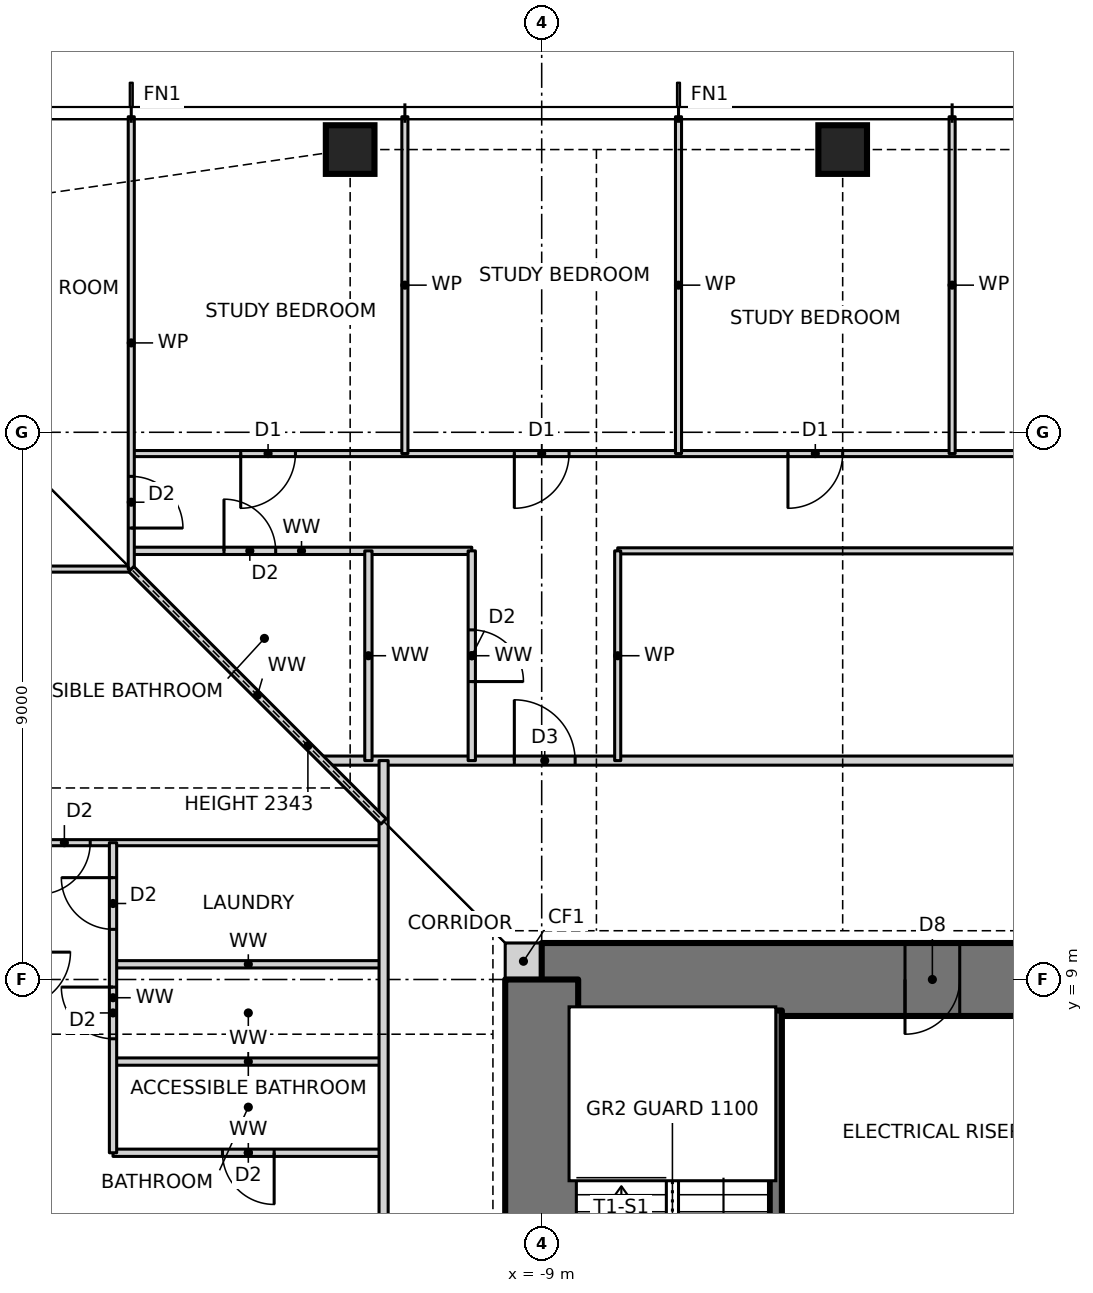
"""IFC4 building model, lengths in metres.
Left out: names, types, materials, properties, quantities, classifications, styles, units other than length and angle.
Written with IfcOpenShell. Run it as: python <this file> out.ifc"""

import sys

from ifc_helpers import new_model, si_unit, direction, frame, frame_2d, origin, origin_2d, place, context, subcontext, project, spatial, rectangle, hollow_rectangle, extrude, element, fill, save


model = new_model("IFC4")
c1 = context("Model", 3, precision=1e-05, world=origin(), true_north=direction((0.0, 1.0)))
c2 = subcontext(c1, "Body", "Model", "MODEL_VIEW")
j1 = project(units=[si_unit("LENGTHUNIT", "METRE"), si_unit("PLANEANGLEUNIT", "RADIAN")], contexts=[c1])
p1 = place(None, origin())
s1 = spatial("IfcSite", under=j1, at=p1, CompositionType="ELEMENT")
p2 = place(p1, origin())
s2 = spatial("IfcBuilding", under=s1, at=p2, CompositionType="ELEMENT")
p3 = place(p2, frame((0.0, 0.0, 43.0)))
s3 = spatial("IfcBuildingStorey", under=s2, at=p3, CompositionType="ELEMENT", Elevation=43.0)
for number, where, z_axis, x_axis in (
    (1, (-4.05, 22.65, 0.0), (0.0, 0.0, 1.0), (1.0, 0.0, 0.0)),
    (2, (-12.15, 22.65, 0.0), (0.0, 0.0, 1.0), (1.0, 0.0, 0.0)),
):
    element("IfcColumn", number, at=place(p3, frame(where, z_axis=z_axis, x_axis=x_axis)), inside=s3, PredefinedType="COLUMN", context=c2, shape_type="SweptSolid", body=[
        extrude(hollow_rectangle(XDim=0.8, YDim=0.8, WallThickness=0.09, at=origin_2d()), origin(), (0.0, 0.0, 1.0), 3.5),
    ])
p4 = place(p3, frame((-9.6, 9.3, 0.0), z_axis=(0.0, 0.0, 1.0), x_axis=(1.0, 0.0, 0.0)))
e3 = element("IfcWall", 3, at=p4, inside=s3, PredefinedType="SOLIDWALL", context=c2, shape_type="SweptSolid", body=[
    extrude(rectangle(XDim=0.6, YDim=0.6, at=frame_2d((0.3, 0.0))), origin(), (0.0, 0.0, 1.0), 3.5),
])
p5 = place(p3, frame((9.0, 9.0, 0.0), z_axis=(0.0, 0.0, 1.0), x_axis=(-1.0, 0.0, 0.0)))
e4 = element("IfcWall", 4, at=p5, inside=s3, PredefinedType="SHEAR", context=c2, shape_type="SweptSolid", body=[
    extrude(rectangle(XDim=18.0, YDim=1.2, at=frame_2d((9.0, 0.0))), origin(), (0.0, 0.0, 1.0), 3.5),
])
p6 = place(p5, frame((11.125, 0.0, 0.0)))
e5 = element("IfcOpeningElement", 5, at=p6, cuts=e4, PredefinedType="OPENING", context=c2, shape_type="SweptSolid", body=[
    extrude(rectangle(XDim=0.9, YDim=2.1, at=frame_2d((0.45, 1.05))), frame((0.0, 0.61, 0.0), z_axis=(0.0, -1.0, 0.0), x_axis=(1.0, 0.0, 0.0)), (0.0, 0.0, 1.0), 1.22),
])
p7 = place(p5, frame((4.275, 0.0, 0.0)))
e6 = element("IfcOpeningElement", 6, at=p7, cuts=e4, PredefinedType="OPENING", context=c2, shape_type="SweptSolid", body=[
    extrude(rectangle(XDim=0.9, YDim=2.1, at=frame_2d((0.45, 1.05))), frame((0.0, 0.61, 0.0), z_axis=(0.0, -1.0, 0.0), x_axis=(1.0, 0.0, 0.0)), (0.0, 0.0, 1.0), 1.22),
])
p8 = place(p3, frame((-9.0, 9.0, 0.0), z_axis=(0.0, 0.0, 1.0), x_axis=(0.0, -1.0, 0.0)))
e7 = element("IfcWall", 7, at=p8, inside=s3, PredefinedType="SHEAR", context=c2, shape_type="SweptSolid", body=[
    extrude(rectangle(XDim=18.0, YDim=1.2, at=frame_2d((9.0, 0.0))), origin(), (0.0, 0.0, 1.0), 3.5),
])
p9 = place(p8, frame((8.5, 0.0, 0.0)))
e8 = element("IfcOpeningElement", 8, at=p9, cuts=e7, PredefinedType="OPENING", context=c2, shape_type="SweptSolid", body=[
    extrude(rectangle(XDim=1.0, YDim=2.1, at=frame_2d((0.5, 1.05))), frame((0.0, 0.61, 0.0), z_axis=(0.0, -1.0, 0.0), x_axis=(1.0, 0.0, 0.0)), (0.0, 0.0, 1.0), 1.22),
])
p10 = place(p3, frame((-16.05, 6.15, 0.0), z_axis=(0.0, 0.0, 1.0), x_axis=(1.0, 0.0, 0.0)))
e9 = element("IfcWall", 9, at=p10, inside=s3, PredefinedType="PARTITIONING", context=c2, shape_type="SweptSolid", body=[
    extrude(rectangle(XDim=4.45, YDim=0.12, at=frame_2d((2.225, 0.0))), origin(), (0.0, 0.0, 1.0), 3.27),
])
p11 = place(p10, frame((1.8, 0.0, 0.0)))
e10 = element("IfcOpeningElement", 10, at=p11, cuts=e9, PredefinedType="OPENING", context=c2, shape_type="SweptSolid", body=[
    extrude(rectangle(XDim=0.85, YDim=2.1, at=frame_2d((0.425, 1.05))), frame((0.0, 0.07, 0.0), z_axis=(0.0, -1.0, 0.0), x_axis=(1.0, 0.0, 0.0)), (0.0, 0.0, 1.0), 0.14),
])
for number, where, z_axis, x_axis in (
    (11, (-16.05, 7.65, 0.0), (0.0, 0.0, 1.0), (1.0, 0.0, 0.0)),
    (12, (-16.05, 9.25, 0.0), (0.0, 0.0, 1.0), (1.0, 0.0, 0.0)),
):
    element("IfcWall", number, at=place(p3, frame(where, z_axis=z_axis, x_axis=x_axis)), inside=s3, PredefinedType="PARTITIONING", context=c2, shape_type="SweptSolid", body=[
        extrude(rectangle(XDim=4.45, YDim=0.12, at=frame_2d((2.225, 0.0))), origin(), (0.0, 0.0, 1.0), 3.27),
    ])
p12 = place(p3, frame((-23.19, 11.25, 0.0), z_axis=(0.0, 0.0, 1.0), x_axis=(1.0, 0.0, 0.0)))
e13 = element("IfcWall", 13, at=p12, inside=s3, PredefinedType="PARTITIONING", context=c2, shape_type="SweptSolid", body=[
    extrude(rectangle(XDim=11.59, YDim=0.1, at=frame_2d((5.795, 0.0))), origin(), (0.0, 0.0, 1.0), 3.27),
])
p13 = place(p12, frame((5.915, 0.0, 0.0)))
e14 = element("IfcOpeningElement", 14, at=p13, cuts=e13, PredefinedType="OPENING", context=c2, shape_type="SweptSolid", body=[
    extrude(rectangle(XDim=0.85, YDim=2.1, at=frame_2d((0.425, 1.05))), frame((0.0, 0.06, 0.0), z_axis=(0.0, -1.0, 0.0), x_axis=(1.0, 0.0, 0.0)), (0.0, 0.0, 1.0), 0.12),
])
p14 = place(p3, frame((-12.6, 12.6, 0.0), z_axis=(0.0, 0.0, 1.0), x_axis=(1.0, 0.0, 0.0)))
e15 = element("IfcWall", 15, at=p14, inside=s3, PredefinedType="PARTITIONING", context=c2, shape_type="SweptSolid", body=[
    extrude(rectangle(XDim=25.2, YDim=0.15, at=frame_2d((12.6, 0.0))), origin(), (0.0, 0.0, 1.0), 3.27),
])
p15 = place(p14, frame((3.15, 0.0, 0.0)))
e16 = element("IfcOpeningElement", 16, at=p15, cuts=e15, PredefinedType="OPENING", context=c2, shape_type="SweptSolid", body=[
    extrude(rectangle(XDim=1.0, YDim=2.1, at=frame_2d((0.5, 1.05))), frame((0.0, 0.085, 0.0), z_axis=(0.0, -1.0, 0.0), x_axis=(1.0, 0.0, 0.0)), (0.0, 0.0, 1.0), 0.17),
])
p16 = place(p3, frame((-23.19, 15.75, 0.0), z_axis=(0.0, 0.0, 1.0), x_axis=(1.0, 0.0, 0.0)))
e17 = element("IfcWall", 17, at=p16, inside=s3, PredefinedType="PARTITIONING", context=c2, shape_type="SweptSolid", body=[
    extrude(rectangle(XDim=7.44, YDim=0.1, at=frame_2d((3.72, 0.0))), origin(), (0.0, 0.0, 1.0), 3.27),
])
p17 = place(p3, frame((-15.75, 16.05, 0.0), z_axis=(0.0, 0.0, 1.0), x_axis=(1.0, 0.0, 0.0)))
e18 = element("IfcWall", 18, at=p17, inside=s3, PredefinedType="PARTITIONING", context=c2, shape_type="SweptSolid", body=[
    extrude(rectangle(XDim=5.6, YDim=0.12, at=frame_2d((2.8, 0.0))), origin(), (0.0, 0.0, 1.0), 3.27),
])
p18 = place(p17, frame((1.525, 0.0, 0.0)))
e19 = element("IfcOpeningElement", 19, at=p18, cuts=e18, PredefinedType="OPENING", context=c2, shape_type="SweptSolid", body=[
    extrude(rectangle(XDim=0.85, YDim=2.1, at=frame_2d((0.425, 1.05))), frame((0.0, 0.07, 0.0), z_axis=(0.0, -1.0, 0.0), x_axis=(1.0, 0.0, 0.0)), (0.0, 0.0, 1.0), 0.14),
])
p19 = place(p3, frame((-7.75, 16.05, 0.0), z_axis=(0.0, 0.0, 1.0), x_axis=(1.0, 0.0, 0.0)))
e20 = element("IfcWall", 20, at=p19, inside=s3, PredefinedType="PARTITIONING", context=c2, shape_type="SweptSolid", body=[
    extrude(rectangle(XDim=17.9, YDim=0.1, at=frame_2d((8.95, 0.0))), origin(), (0.0, 0.0, 1.0), 3.27),
])
p20 = place(p19, frame((8.525, 0.0, 0.0)))
e21 = element("IfcOpeningElement", 21, at=p20, cuts=e20, PredefinedType="OPENING", context=c2, shape_type="SweptSolid", body=[
    extrude(rectangle(XDim=0.85, YDim=2.1, at=frame_2d((0.425, 1.05))), frame((0.0, 0.06, 0.0), z_axis=(0.0, -1.0, 0.0), x_axis=(1.0, 0.0, 0.0)), (0.0, 0.0, 1.0), 0.12),
])
p21 = place(p3, frame((-15.75, 17.65, 0.0), z_axis=(0.0, 0.0, 1.0), x_axis=(1.0, 0.0, 0.0)))
e22 = element("IfcWall", 22, at=p21, inside=s3, PredefinedType="PARTITIONING", context=c2, shape_type="SweptSolid", body=[
    extrude(rectangle(XDim=31.5, YDim=0.1, at=frame_2d((15.75, 0.0))), origin(), (0.0, 0.0, 1.0), 3.27),
])
p22 = place(p21, frame((28.8, 0.0, 0.0)))
e23 = element("IfcOpeningElement", 23, at=p22, cuts=e22, PredefinedType="OPENING", context=c2, shape_type="SweptSolid", body=[
    extrude(rectangle(XDim=0.9, YDim=2.1, at=frame_2d((0.45, 1.05))), frame((0.0, 0.06, 0.0), z_axis=(0.0, -1.0, 0.0), x_axis=(1.0, 0.0, 0.0)), (0.0, 0.0, 1.0), 0.12),
])
p23 = place(p21, frame((24.3, 0.0, 0.0)))
e24 = element("IfcOpeningElement", 24, at=p23, cuts=e22, PredefinedType="OPENING", context=c2, shape_type="SweptSolid", body=[
    extrude(rectangle(XDim=0.9, YDim=2.1, at=frame_2d((0.45, 1.05))), frame((0.0, 0.06, 0.0), z_axis=(0.0, -1.0, 0.0), x_axis=(1.0, 0.0, 0.0)), (0.0, 0.0, 1.0), 0.12),
])
p24 = place(p21, frame((19.8, 0.0, 0.0)))
e25 = element("IfcOpeningElement", 25, at=p24, cuts=e22, PredefinedType="OPENING", context=c2, shape_type="SweptSolid", body=[
    extrude(rectangle(XDim=0.9, YDim=2.1, at=frame_2d((0.45, 1.05))), frame((0.0, 0.06, 0.0), z_axis=(0.0, -1.0, 0.0), x_axis=(1.0, 0.0, 0.0)), (0.0, 0.0, 1.0), 0.12),
])
p25 = place(p21, frame((15.3, 0.0, 0.0)))
e26 = element("IfcOpeningElement", 26, at=p25, cuts=e22, PredefinedType="OPENING", context=c2, shape_type="SweptSolid", body=[
    extrude(rectangle(XDim=0.9, YDim=2.1, at=frame_2d((0.45, 1.05))), frame((0.0, 0.06, 0.0), z_axis=(0.0, -1.0, 0.0), x_axis=(1.0, 0.0, 0.0)), (0.0, 0.0, 1.0), 0.12),
])
p26 = place(p21, frame((10.8, 0.0, 0.0)))
e27 = element("IfcOpeningElement", 27, at=p26, cuts=e22, PredefinedType="OPENING", context=c2, shape_type="SweptSolid", body=[
    extrude(rectangle(XDim=0.9, YDim=2.1, at=frame_2d((0.45, 1.05))), frame((0.0, 0.06, 0.0), z_axis=(0.0, -1.0, 0.0), x_axis=(1.0, 0.0, 0.0)), (0.0, 0.0, 1.0), 0.12),
])
p27 = place(p21, frame((6.3, 0.0, 0.0)))
e28 = element("IfcOpeningElement", 28, at=p27, cuts=e22, PredefinedType="OPENING", context=c2, shape_type="SweptSolid", body=[
    extrude(rectangle(XDim=0.9, YDim=2.1, at=frame_2d((0.45, 1.05))), frame((0.0, 0.06, 0.0), z_axis=(0.0, -1.0, 0.0), x_axis=(1.0, 0.0, 0.0)), (0.0, 0.0, 1.0), 0.12),
])
p28 = place(p21, frame((1.8, 0.0, 0.0)))
e29 = element("IfcOpeningElement", 29, at=p28, cuts=e22, PredefinedType="OPENING", context=c2, shape_type="SweptSolid", body=[
    extrude(rectangle(XDim=0.9, YDim=2.1, at=frame_2d((0.45, 1.05))), frame((0.0, 0.06, 0.0), z_axis=(0.0, -1.0, 0.0), x_axis=(1.0, 0.0, 0.0)), (0.0, 0.0, 1.0), 0.12),
])
p29 = place(p3, frame((-2.25, 17.65, 0.0), z_axis=(0.0, 0.0, 1.0), x_axis=(0.0, 1.0, 0.0)))
e30 = element("IfcWall", 30, at=p29, inside=s3, PredefinedType="PARTITIONING", context=c2, shape_type="SweptSolid", body=[
    extrude(rectangle(XDim=5.54, YDim=0.1, at=frame_2d((2.77, 0.0))), origin(), (0.0, 0.0, 1.0), 3.27),
])
p30 = place(p3, frame((-5.15, 1.6, 0.0), z_axis=(0.0, 0.0, 1.0), x_axis=(0.0, 1.0, 0.0)))
e31 = element("IfcWall", 31, at=p30, inside=s3, PredefinedType="SOLIDWALL", context=c2, shape_type="SweptSolid", body=[
    extrude(rectangle(XDim=6.89, YDim=0.2, at=frame_2d((3.445, 0.0))), origin(), (0.0, 0.0, 1.0), 3.5),
])
p31 = place(p3, frame((-6.75, 17.65, 0.0), z_axis=(0.0, 0.0, 1.0), x_axis=(0.0, 1.0, 0.0)))
e32 = element("IfcWall", 32, at=p31, inside=s3, PredefinedType="PARTITIONING", context=c2, shape_type="SweptSolid", body=[
    extrude(rectangle(XDim=5.54, YDim=0.1, at=frame_2d((2.77, 0.0))), origin(), (0.0, 0.0, 1.0), 3.27),
])
p32 = place(p3, frame((-7.75, 12.6, 0.0), z_axis=(0.0, 0.0, 1.0), x_axis=(0.0, 1.0, 0.0)))
e33 = element("IfcWall", 33, at=p32, inside=s3, PredefinedType="PARTITIONING", context=c2, shape_type="SweptSolid", body=[
    extrude(rectangle(XDim=3.45, YDim=0.1, at=frame_2d((1.725, 0.0))), origin(), (0.0, 0.0, 1.0), 3.27),
])
p33 = place(p3, frame((-10.15, 12.6, 0.0), z_axis=(0.0, 0.0, 1.0), x_axis=(0.0, 1.0, 0.0)))
e34 = element("IfcWall", 34, at=p33, inside=s3, PredefinedType="PARTITIONING", context=c2, shape_type="SweptSolid", body=[
    extrude(rectangle(XDim=3.45, YDim=0.12, at=frame_2d((1.725, 0.0))), origin(), (0.0, 0.0, 1.0), 3.27),
])
p34 = place(p33, frame((1.3, 0.0, 0.0)))
e35 = element("IfcOpeningElement", 35, at=p34, cuts=e34, PredefinedType="OPENING", context=c2, shape_type="SweptSolid", body=[
    extrude(rectangle(XDim=0.85, YDim=2.1, at=frame_2d((0.425, 1.05))), frame((0.0, 0.07, 0.0), z_axis=(0.0, -1.0, 0.0), x_axis=(1.0, 0.0, 0.0)), (0.0, 0.0, 1.0), 0.14),
])
p35 = place(p3, frame((-11.25, 17.65, 0.0), z_axis=(0.0, 0.0, 1.0), x_axis=(0.0, 1.0, 0.0)))
e36 = element("IfcWall", 36, at=p35, inside=s3, PredefinedType="PARTITIONING", context=c2, shape_type="SweptSolid", body=[
    extrude(rectangle(XDim=5.54, YDim=0.1, at=frame_2d((2.77, 0.0))), origin(), (0.0, 0.0, 1.0), 3.27),
])
p36 = place(p3, frame((-11.6, -11.6, 0.0), z_axis=(0.0, 0.0, 1.0), x_axis=(0.0, 1.0, 0.0)))
e37 = element("IfcWall", 37, at=p36, inside=s3, PredefinedType="PARTITIONING", context=c2, shape_type="SweptSolid", body=[
    extrude(rectangle(XDim=24.2, YDim=0.15, at=frame_2d((12.1, 0.0))), origin(), (0.0, 0.0, 1.0), 3.27),
])
p37 = place(p36, frame((12.14, 0.0, 0.0)))
e38 = element("IfcOpeningElement", 38, at=p37, cuts=e37, PredefinedType="OPENING", context=c2, shape_type="SweptSolid", body=[
    extrude(rectangle(XDim=1.0, YDim=2.1, at=frame_2d((0.5, 1.05))), frame((0.0, 0.085, 0.0), z_axis=(0.0, -1.0, 0.0), x_axis=(1.0, 0.0, 0.0)), (0.0, 0.0, 1.0), 0.17),
])
p38 = place(p3, frame((-11.85, 12.6, 0.0), z_axis=(0.0, 0.0, 1.0), x_axis=(0.0, 1.0, 0.0)))
e39 = element("IfcWall", 39, at=p38, inside=s3, PredefinedType="PARTITIONING", context=c2, shape_type="SweptSolid", body=[
    extrude(rectangle(XDim=3.45, YDim=0.12, at=frame_2d((1.725, 0.0))), origin(), (0.0, 0.0, 1.0), 3.27),
])
p39 = place(p3, frame((-15.75, 15.75, 0.0), z_axis=(0.0, 0.0, 1.0), x_axis=(0.0, 1.0, 0.0)))
e40 = element("IfcWall", 40, at=p39, inside=s3, PredefinedType="PARTITIONING", context=c2, shape_type="SweptSolid", body=[
    extrude(rectangle(XDim=7.44, YDim=0.1, at=frame_2d((3.72, 0.0))), origin(), (0.0, 0.0, 1.0), 3.27),
])
p40 = place(p39, frame((0.675, 0.0, 0.0)))
e41 = element("IfcOpeningElement", 41, at=p40, cuts=e40, PredefinedType="OPENING", context=c2, shape_type="SweptSolid", body=[
    extrude(rectangle(XDim=0.85, YDim=2.1, at=frame_2d((0.425, 1.05))), frame((0.0, 0.06, 0.0), z_axis=(0.0, -1.0, 0.0), x_axis=(1.0, 0.0, 0.0)), (0.0, 0.0, 1.0), 0.12),
])
p41 = place(p3, frame((-16.05, 6.15, 0.0), z_axis=(0.0, 0.0, 1.0), x_axis=(0.0, 1.0, 0.0)))
e42 = element("IfcWall", 42, at=p41, inside=s3, PredefinedType="PARTITIONING", context=c2, shape_type="SweptSolid", body=[
    extrude(rectangle(XDim=5.1, YDim=0.12, at=frame_2d((2.55, 0.0))), origin(), (0.0, 0.0, 1.0), 3.27),
])
p42 = place(p41, frame((3.675, 0.0, 0.0)))
e43 = element("IfcOpeningElement", 43, at=p42, cuts=e42, PredefinedType="OPENING", context=c2, shape_type="SweptSolid", body=[
    extrude(rectangle(XDim=0.85, YDim=2.1, at=frame_2d((0.425, 1.05))), frame((0.0, 0.07, 0.0), z_axis=(0.0, -1.0, 0.0), x_axis=(1.0, 0.0, 0.0)), (0.0, 0.0, 1.0), 0.14),
])
p43 = place(p41, frame((1.875, 0.0, 0.0)))
e44 = element("IfcOpeningElement", 44, at=p43, cuts=e42, PredefinedType="OPENING", context=c2, shape_type="SweptSolid", body=[
    extrude(rectangle(XDim=0.85, YDim=2.1, at=frame_2d((0.425, 1.05))), frame((0.0, 0.07, 0.0), z_axis=(0.0, -1.0, 0.0), x_axis=(1.0, 0.0, 0.0)), (0.0, 0.0, 1.0), 0.14),
])
p44 = place(p3, frame((-11.6, 11.6, 0.0), z_axis=(0.0, 0.0, 1.0), x_axis=(-0.707106781187, 0.707106781187, 0.0)))
e45 = element("IfcWall", 45, at=p44, inside=s3, PredefinedType="PARTITIONING", context=c2, shape_type="SweptSolid", body=[
    extrude(rectangle(XDim=5.869, YDim=0.12, at=frame_2d((2.935, 0.0))), origin(), (0.0, 0.0, 1.0), 2.343),
])
p45 = place(p26, frame((0.9, 0.0, 0.0), z_axis=(0.0, 0.0, 1.0), x_axis=(-1.0, 0.0, 0.0)))
e46 = element("IfcDoor", 46, at=p45, inside=s3, OperationType="SINGLE_SWING_RIGHT", PredefinedType="DOOR", context=c2, shape_type="SweptSolid", body=[
    extrude(rectangle(XDim=0.9, YDim=2.1, at=frame_2d((0.45, 1.05))), frame((0.0, 0.025, 0.0), z_axis=(0.0, -1.0, 0.0), x_axis=(1.0, 0.0, 0.0)), (0.0, 0.0, 1.0), 0.05),
])
fill(e27, e46)
p46 = place(p27, frame((0.9, 0.0, 0.0), z_axis=(0.0, 0.0, 1.0), x_axis=(-1.0, 0.0, 0.0)))
e47 = element("IfcDoor", 47, at=p46, inside=s3, OperationType="SINGLE_SWING_RIGHT", PredefinedType="DOOR", context=c2, shape_type="SweptSolid", body=[
    extrude(rectangle(XDim=0.9, YDim=2.1, at=frame_2d((0.45, 1.05))), frame((0.0, 0.025, 0.0), z_axis=(0.0, -1.0, 0.0), x_axis=(1.0, 0.0, 0.0)), (0.0, 0.0, 1.0), 0.05),
])
fill(e28, e47)
p47 = place(p28, frame((0.9, 0.0, 0.0), z_axis=(0.0, 0.0, 1.0), x_axis=(-1.0, 0.0, 0.0)))
e48 = element("IfcDoor", 48, at=p47, inside=s3, OperationType="SINGLE_SWING_RIGHT", PredefinedType="DOOR", context=c2, shape_type="SweptSolid", body=[
    extrude(rectangle(XDim=0.9, YDim=2.1, at=frame_2d((0.45, 1.05))), frame((0.0, 0.025, 0.0), z_axis=(0.0, -1.0, 0.0), x_axis=(1.0, 0.0, 0.0)), (0.0, 0.0, 1.0), 0.05),
])
fill(e29, e48)
p48 = place(p15, origin())
e49 = element("IfcDoor", 49, at=p48, inside=s3, OperationType="SINGLE_SWING_LEFT", PredefinedType="DOOR", context=c2, shape_type="SweptSolid", body=[
    extrude(rectangle(XDim=1.0, YDim=2.1, at=frame_2d((0.5, 1.05))), frame((0.0, 0.025, 0.0), z_axis=(0.0, -1.0, 0.0), x_axis=(1.0, 0.0, 0.0)), (0.0, 0.0, 1.0), 0.05),
])
fill(e16, e49)
p49 = place(p34, frame((0.85, 0.0, 0.0), z_axis=(0.0, 0.0, 1.0), x_axis=(-1.0, 0.0, 0.0)))
e50 = element("IfcDoor", 50, at=p49, inside=s3, OperationType="SINGLE_SWING_RIGHT", PredefinedType="DOOR", context=c2, shape_type="SweptSolid", body=[
    extrude(rectangle(XDim=0.85, YDim=2.1, at=frame_2d((0.425, 1.05))), frame((0.0, 0.025, 0.0), z_axis=(0.0, -1.0, 0.0), x_axis=(1.0, 0.0, 0.0)), (0.0, 0.0, 1.0), 0.05),
])
fill(e35, e50)
p50 = place(p18, origin())
e51 = element("IfcDoor", 51, at=p50, inside=s3, OperationType="SINGLE_SWING_LEFT", PredefinedType="DOOR", context=c2, shape_type="SweptSolid", body=[
    extrude(rectangle(XDim=0.85, YDim=2.1, at=frame_2d((0.425, 1.05))), frame((0.0, 0.025, 0.0), z_axis=(0.0, -1.0, 0.0), x_axis=(1.0, 0.0, 0.0)), (0.0, 0.0, 1.0), 0.05),
])
fill(e19, e51)
p51 = place(p13, frame((0.85, 0.0, 0.0), z_axis=(0.0, 0.0, 1.0), x_axis=(-1.0, 0.0, 0.0)))
e52 = element("IfcDoor", 52, at=p51, inside=s3, OperationType="SINGLE_SWING_RIGHT", PredefinedType="DOOR", context=c2, shape_type="SweptSolid", body=[
    extrude(rectangle(XDim=0.85, YDim=2.1, at=frame_2d((0.425, 1.05))), frame((0.0, 0.025, 0.0), z_axis=(0.0, -1.0, 0.0), x_axis=(1.0, 0.0, 0.0)), (0.0, 0.0, 1.0), 0.05),
])
fill(e14, e52)
p52 = place(p42, origin())
e53 = element("IfcDoor", 53, at=p52, inside=s3, OperationType="SINGLE_SWING_RIGHT", PredefinedType="DOOR", context=c2, shape_type="SweptSolid", body=[
    extrude(rectangle(XDim=0.85, YDim=2.1, at=frame_2d((0.425, 1.05))), frame((0.0, 0.025, 0.0), z_axis=(0.0, -1.0, 0.0), x_axis=(1.0, 0.0, 0.0)), (0.0, 0.0, 1.0), 0.05),
])
fill(e43, e53)
p53 = place(p43, origin())
e54 = element("IfcDoor", 54, at=p53, inside=s3, OperationType="SINGLE_SWING_RIGHT", PredefinedType="DOOR", context=c2, shape_type="SweptSolid", body=[
    extrude(rectangle(XDim=0.85, YDim=2.1, at=frame_2d((0.425, 1.05))), frame((0.0, 0.025, 0.0), z_axis=(0.0, -1.0, 0.0), x_axis=(1.0, 0.0, 0.0)), (0.0, 0.0, 1.0), 0.05),
])
fill(e44, e54)
p54 = place(p11, frame((0.85, 0.0, 0.0), z_axis=(0.0, 0.0, 1.0), x_axis=(-1.0, 0.0, 0.0)))
e55 = element("IfcDoor", 55, at=p54, inside=s3, OperationType="SINGLE_SWING_LEFT", PredefinedType="DOOR", context=c2, shape_type="SweptSolid", body=[
    extrude(rectangle(XDim=0.85, YDim=2.1, at=frame_2d((0.425, 1.05))), frame((0.0, 0.025, 0.0), z_axis=(0.0, -1.0, 0.0), x_axis=(1.0, 0.0, 0.0)), (0.0, 0.0, 1.0), 0.05),
])
fill(e10, e55)
p55 = place(p40, frame((0.85, 0.0, 0.0), z_axis=(0.0, 0.0, 1.0), x_axis=(-1.0, 0.0, 0.0)))
e56 = element("IfcDoor", 56, at=p55, inside=s3, OperationType="SINGLE_SWING_RIGHT", PredefinedType="DOOR", context=c2, shape_type="SweptSolid", body=[
    extrude(rectangle(XDim=0.85, YDim=2.1, at=frame_2d((0.425, 1.05))), frame((0.0, 0.025, 0.0), z_axis=(0.0, -1.0, 0.0), x_axis=(1.0, 0.0, 0.0)), (0.0, 0.0, 1.0), 0.05),
])
fill(e41, e56)
p56 = place(p6, origin())
e57 = element("IfcDoor", 57, at=p56, inside=s3, OperationType="SINGLE_SWING_RIGHT", PredefinedType="DOOR", context=c2, shape_type="SweptSolid", body=[
    extrude(rectangle(XDim=0.9, YDim=2.1, at=frame_2d((0.45, 1.05))), frame((0.0, 0.025, 0.0), z_axis=(0.0, -1.0, 0.0), x_axis=(1.0, 0.0, 0.0)), (0.0, 0.0, 1.0), 0.05),
])
fill(e5, e57)
save(model, sys.argv[1])
